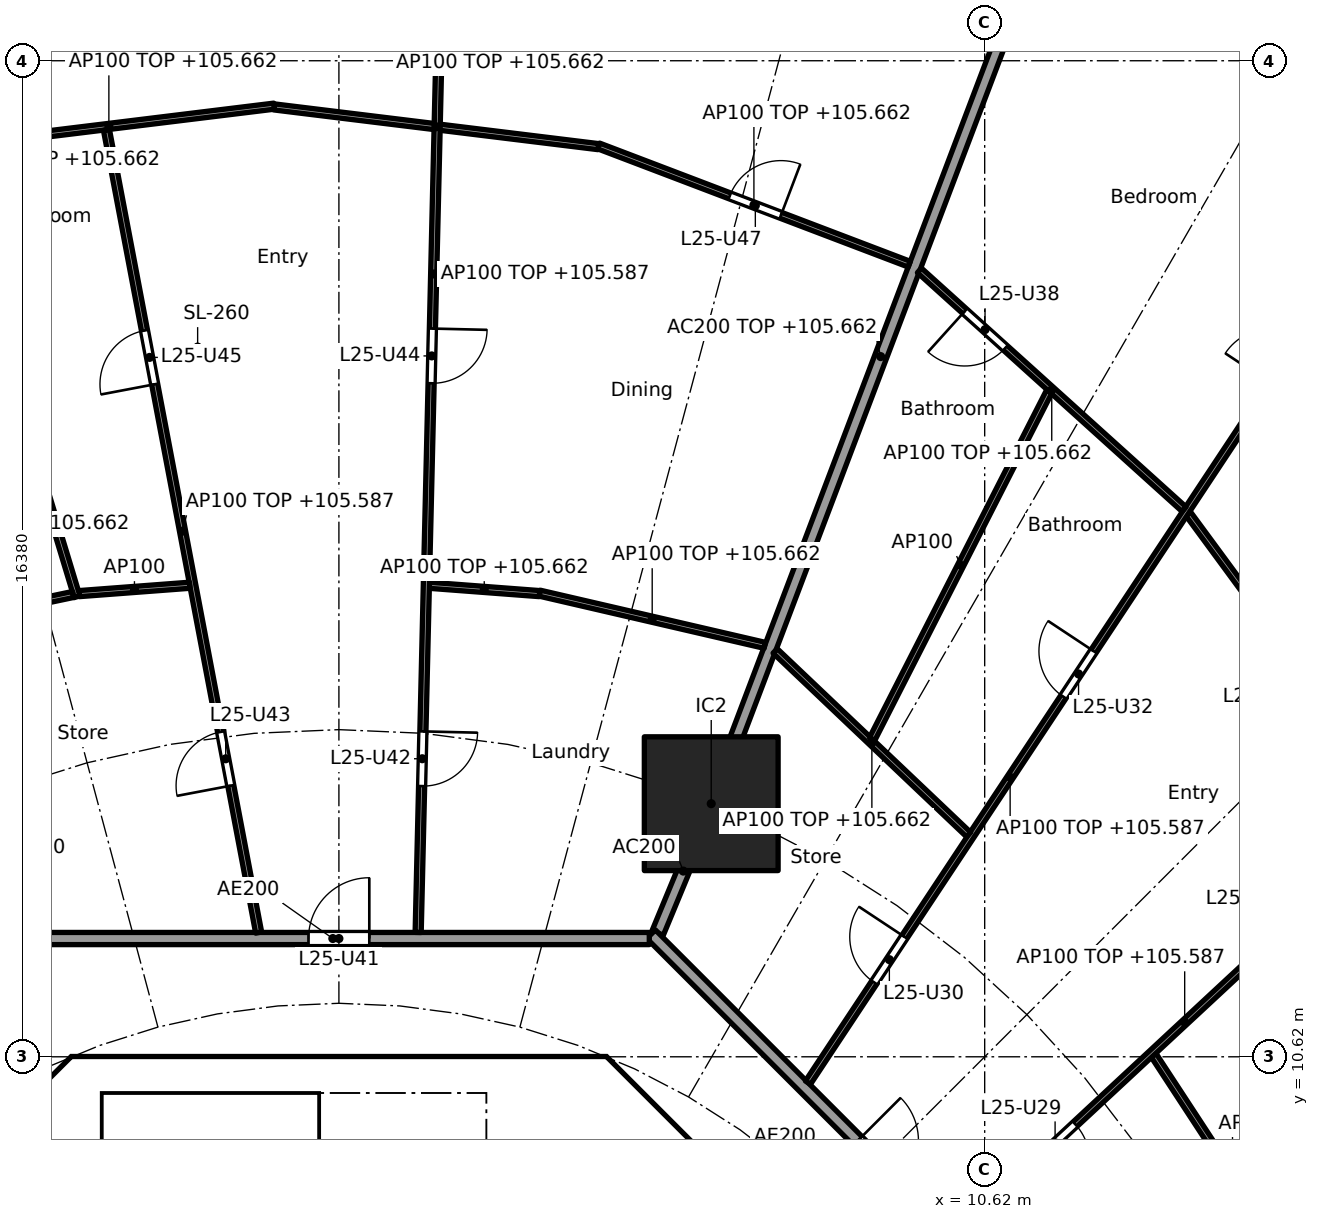
"""IFC4 building model, lengths in metres.
Left out: names, types, materials, properties, quantities, classifications, styles, units other than length and angle.
Written with IfcOpenShell. Run it as: python <this file> out.ifc"""

import sys

from ifc_helpers import new_model, si_unit, direction, frame, frame_2d, origin, origin_2d, place, context, subcontext, project, spatial, polyline, rectangle, outline, extrude, element, fill, save


model = new_model("IFC4")
c1 = context("Model", 3, precision=1e-05, world=origin(), true_north=direction((0.0, 1.0)))
c2 = subcontext(c1, "Body", "Model", "MODEL_VIEW")
j1 = project(units=[si_unit("LENGTHUNIT", "METRE"), si_unit("PLANEANGLEUNIT", "RADIAN")], contexts=[c1])
p1 = place(None, origin())
s1 = spatial("IfcSite", under=j1, at=p1, CompositionType="ELEMENT")
p2 = place(p1, origin())
s2 = spatial("IfcBuilding", under=s1, at=p2, CompositionType="ELEMENT")
p3 = place(p2, frame((0.0, 0.0, 102.9)))
s3 = spatial("IfcBuildingStorey", under=s2, at=p3, CompositionType="ELEMENT", Elevation=102.9)
p4 = place(p3, frame((6.123, 14.782, 0.0), z_axis=(0.0, 0.0, 1.0), x_axis=(1.0, 0.0, 0.0)))
e1 = element("IfcColumn", 1, at=p4, inside=s3, PredefinedType="COLUMN", context=c2, shape_type="SweptSolid", body=[
    extrude(rectangle(XDim=2.2, YDim=2.2, at=origin_2d()), origin(), (0.0, 0.0, 1.0), 3.7),
])
p5 = place(p3, frame((9.988, 4.613, 0.0), z_axis=(0.0, 0.0, 1.0), x_axis=(-0.707106781187, 0.707106781187, 0.0)))
e2 = element("IfcWall", 2, at=p5, inside=s3, PredefinedType="SHEAR", context=c2, shape_type="SweptSolid", body=[
    extrude(rectangle(XDim=7.602, YDim=0.6, at=frame_2d((3.801, 0.0))), origin(), (0.0, 0.0, 1.0), 3.44),
])
p6 = place(p5, frame((3.201, 0.0, 0.0)))
e3 = element("IfcOpeningElement", 3, at=p6, cuts=e2, PredefinedType="OPENING", context=c2, shape_type="SweptSolid", body=[
    extrude(rectangle(XDim=1.2, YDim=2.1, at=frame_2d((0.6, 1.05))), frame((0.0, 0.31, 0.0), z_axis=(0.0, -1.0, 0.0), x_axis=(1.0, 0.0, 0.0)), (0.0, 0.0, 1.0), 0.62),
])
p7 = place(p3, frame((-4.613, 9.988, 0.0), z_axis=(0.0, 0.0, 1.0), x_axis=(-0.707106781187, -0.707106781187, 0.0)))
e4 = element("IfcWall", 4, at=p7, inside=s3, PredefinedType="SHEAR", context=c2, shape_type="SweptSolid", body=[
    extrude(rectangle(XDim=7.602, YDim=0.6, at=frame_2d((3.801, 0.0))), origin(), (0.0, 0.0, 1.0), 3.44),
])
p8 = place(p7, frame((0.351, 0.0, 0.0)))
e5 = element("IfcOpeningElement", 5, at=p8, cuts=e4, PredefinedType="OPENING", context=c2, shape_type="SweptSolid", body=[
    extrude(rectangle(XDim=1.1, YDim=2.1, at=frame_2d((0.55, 1.05))), frame((0.0, 0.31, 0.0), z_axis=(0.0, -1.0, 0.0), x_axis=(1.0, 0.0, 0.0)), (0.0, 0.0, 1.0), 0.62),
])
p9 = place(p3, frame((4.0, 7.025, 0.0), z_axis=(0.0, 0.0, 1.0), x_axis=(0.0, 1.0, 0.0)))
e6 = element("IfcWall", 6, at=p9, inside=s3, PredefinedType="SOLIDWALL", context=c2, shape_type="SweptSolid", body=[
    extrude(rectangle(XDim=3.0, YDim=0.2, at=frame_2d((1.5, 0.0))), origin(), (0.0, 0.0, 1.0), 3.44),
])
p10 = place(p9, frame((0.925, 0.0, 0.0)))
e7 = element("IfcOpeningElement", 7, at=p10, cuts=e6, PredefinedType="OPENING", context=c2, shape_type="SweptSolid", body=[
    extrude(rectangle(XDim=1.1, YDim=2.1, at=frame_2d((0.55, 1.05))), frame((0.0, 0.11, 0.0), z_axis=(0.0, -1.0, 0.0), x_axis=(1.0, 0.0, 0.0)), (0.0, 0.0, 1.0), 0.22),
])
p11 = place(p3, origin())
e8 = element("IfcWall", 8, at=p11, inside=s3, PredefinedType="SHEAR", context=c2, shape_type="SweptSolid", body=[
    extrude(outline(polyline([(-4.152, 10.025), (-4.401, 9.776), (-4.825, 10.2), (-4.401, 10.625), (4.401, 10.625), (4.825, 10.2), (4.401, 9.776), (4.152, 10.025), (-4.152, 10.025)])), origin(), (0.0, 0.0, 1.0), 3.44),
])
p12 = place(p3, origin())
e9 = element("IfcWall", 9, at=p12, inside=s3, PredefinedType="SOLIDWALL", context=c2, shape_type="SweptSolid", body=[
    extrude(outline(polyline([(-3.9, 7.025), (-4.1, 7.025), (-4.1, 10.025), (-3.9, 10.025), (-3.9, 7.025)])), origin(), (0.0, 0.0, 1.0), 3.44),
])
p13 = place(p3, frame((5.243, 12.657, 0.0), z_axis=(0.0, 0.0, 1.0), x_axis=(0.382724096228, 0.923862687939, 0.0)))
e10 = element("IfcWall", 10, at=p13, inside=s3, PredefinedType="PARTITIONING", context=c2, shape_type="SweptSolid", body=[
    extrude(rectangle(XDim=2.201, YDim=0.2, at=frame_2d((1.1, 0.0))), origin(), (0.0, 0.0, 1.0), 3.44),
])
p14 = place(p3, frame((6.141, 14.829, 0.0), z_axis=(0.0, 0.0, 1.0), x_axis=(0.354477134193, 0.935064682968, 0.0)))
e11 = element("IfcWall", 11, at=p14, inside=s3, PredefinedType="PARTITIONING", context=c2, shape_type="SweptSolid", body=[
    extrude(rectangle(XDim=15.626, YDim=0.2, at=frame_2d((7.813, 0.0))), origin(), (0.0, 0.0, 1.0), 2.762),
])
p15 = place(p3, frame((12.635, 5.134, 0.0), z_axis=(0.0, 0.0, 1.0), x_axis=(-0.707106781187, 0.707106781187, 0.0)))
e12 = element("IfcWall", 12, at=p15, inside=s3, PredefinedType="PARTITIONING", context=c2, shape_type="SweptSolid", body=[
    extrude(rectangle(XDim=10.609, YDim=0.2, at=frame_2d((5.305, 0.0))), origin(), (0.0, 0.0, 1.0), 3.44),
])
p16 = place(p15, frame((4.804, 0.0, 0.0)))
e13 = element("IfcOpeningElement", 13, at=p16, cuts=e12, PredefinedType="OPENING", context=c2, shape_type="SweptSolid", body=[
    extrude(rectangle(XDim=1.0, YDim=2.1, at=frame_2d((0.5, 1.05))), frame((0.0, 0.11, 0.0), z_axis=(0.0, -1.0, 0.0), x_axis=(1.0, 0.0, 0.0)), (0.0, 0.0, 1.0), 0.22),
])
p17 = place(p3, frame((5.104, 12.565, 0.0), z_axis=(0.0, 0.0, 1.0), x_axis=(-1.0, 0.0, 0.0)))
e14 = element("IfcWall", 14, at=p17, inside=s3, PredefinedType="PARTITIONING", context=c2, shape_type="SweptSolid", body=[
    extrude(rectangle(XDim=10.409, YDim=0.2, at=frame_2d((5.205, 0.0))), origin(), (0.0, 0.0, 1.0), 3.44),
])
p18 = place(p17, frame((4.604, 0.0, 0.0)))
e15 = element("IfcOpeningElement", 15, at=p18, cuts=e14, PredefinedType="OPENING", context=c2, shape_type="SweptSolid", body=[
    extrude(rectangle(XDim=1.0, YDim=2.1, at=frame_2d((0.5, 1.05))), frame((0.0, 0.11, 0.0), z_axis=(0.0, -1.0, 0.0), x_axis=(1.0, 0.0, 0.0)), (0.0, 0.0, 1.0), 0.22),
])
p19 = place(p3, frame((15.992, 6.68, 0.0), z_axis=(0.0, 0.0, 1.0), x_axis=(-0.547472878942, 0.836823426311, 0.0)))
e16 = element("IfcWall", 16, at=p19, inside=s3, PredefinedType="PARTITIONING", context=c2, shape_type="SweptSolid", body=[
    extrude(rectangle(XDim=4.738, YDim=0.1, at=frame_2d((2.369, 0.0))), origin(), (0.0, 0.0, 1.0), 2.762),
])
p20 = place(p3, frame((10.185, 7.726, 0.0), z_axis=(0.0, 0.0, 1.0), x_axis=(0.732598472978, 0.680661059112, 0.0)))
e17 = element("IfcWall", 17, at=p20, inside=s3, PredefinedType="PARTITIONING", context=c2, shape_type="SweptSolid", body=[
    extrude(rectangle(XDim=10.167, YDim=0.1, at=frame_2d((5.084, 0.0))), origin(), (0.0, 0.0, 1.0), 2.687),
])
p21 = place(p20, frame((1.725, 0.0, 0.0)))
e18 = element("IfcOpeningElement", 18, at=p21, cuts=e17, PredefinedType="OPENING", context=c2, shape_type="SweptSolid", body=[
    extrude(rectangle(XDim=0.9, YDim=2.1, at=frame_2d((0.45, 1.05))), frame((0.0, 0.06, 0.0), z_axis=(0.0, -1.0, 0.0), x_axis=(1.0, 0.0, 0.0)), (0.0, 0.0, 1.0), 0.12),
])
p22 = place(p20, frame((6.784, 0.0, 0.0)))
e19 = element("IfcOpeningElement", 19, at=p22, cuts=e17, PredefinedType="OPENING", context=c2, shape_type="SweptSolid", body=[
    extrude(rectangle(XDim=0.9, YDim=2.1, at=frame_2d((0.45, 1.05))), frame((0.0, 0.06, 0.0), z_axis=(0.0, -1.0, 0.0), x_axis=(1.0, 0.0, 0.0)), (0.0, 0.0, 1.0), 0.12),
])
p23 = place(p3, frame((17.567, 14.653, 0.0), z_axis=(0.0, 0.0, 1.0), x_axis=(-0.592391983588, 0.80564988536, 0.0)))
e20 = element("IfcWall", 20, at=p23, inside=s3, PredefinedType="PARTITIONING", context=c2, shape_type="SweptSolid", body=[
    extrude(rectangle(XDim=6.08, YDim=0.1, at=frame_2d((3.04, 0.0))), origin(), (0.0, 0.0, 1.0), 2.762),
])
p24 = place(p23, frame((2.59, 0.0, 0.0)))
e21 = element("IfcOpeningElement", 21, at=p24, cuts=e20, PredefinedType="OPENING", context=c2, shape_type="SweptSolid", body=[
    extrude(rectangle(XDim=0.9, YDim=2.1, at=frame_2d((0.45, 1.05))), frame((0.0, 0.06, 0.0), z_axis=(0.0, -1.0, 0.0), x_axis=(1.0, 0.0, 0.0)), (0.0, 0.0, 1.0), 0.12),
])
p25 = place(p3, frame((7.713, 10.195, 0.0), z_axis=(0.0, 0.0, 1.0), x_axis=(0.552111071171, 0.833770571015, 0.0)))
e22 = element("IfcWall", 22, at=p25, inside=s3, PredefinedType="PARTITIONING", context=c2, shape_type="SweptSolid", body=[
    extrude(rectangle(XDim=17.208, YDim=0.1, at=frame_2d((8.604, 0.0))), origin(), (0.0, 0.0, 1.0), 2.687),
])
p26 = place(p25, frame((1.976, 0.0, 0.0)))
e23 = element("IfcOpeningElement", 23, at=p26, cuts=e22, PredefinedType="OPENING", context=c2, shape_type="SweptSolid", body=[
    extrude(rectangle(XDim=0.9, YDim=2.1, at=frame_2d((0.45, 1.05))), frame((0.0, 0.06, 0.0), z_axis=(0.0, -1.0, 0.0), x_axis=(1.0, 0.0, 0.0)), (0.0, 0.0, 1.0), 0.12),
])
p27 = place(p25, frame((7.611, 0.0, 0.0)))
e24 = element("IfcOpeningElement", 24, at=p27, cuts=e22, PredefinedType="OPENING", context=c2, shape_type="SweptSolid", body=[
    extrude(rectangle(XDim=0.9, YDim=2.1, at=frame_2d((0.45, 1.05))), frame((0.0, 0.06, 0.0), z_axis=(0.0, -1.0, 0.0), x_axis=(1.0, 0.0, 0.0)), (0.0, 0.0, 1.0), 0.12),
])
p28 = place(p25, frame((13.79, 0.0, 0.0)))
e25 = element("IfcOpeningElement", 25, at=p28, cuts=e22, PredefinedType="OPENING", context=c2, shape_type="SweptSolid", body=[
    extrude(rectangle(XDim=0.9, YDim=2.1, at=frame_2d((0.45, 1.05))), frame((0.0, 0.06, 0.0), z_axis=(0.0, -1.0, 0.0), x_axis=(1.0, 0.0, 0.0)), (0.0, 0.0, 1.0), 0.12),
])
p29 = place(p3, frame((10.355, 14.274, 0.0), z_axis=(0.0, 0.0, 1.0), x_axis=(-0.725206433622, 0.688531501555, 0.0)))
e26 = element("IfcWall", 26, at=p29, inside=s3, PredefinedType="PARTITIONING", context=c2, shape_type="SweptSolid", body=[
    extrude(rectangle(XDim=4.387, YDim=0.1, at=frame_2d((2.193, 0.0))), origin(), (0.0, 0.0, 1.0), 2.762),
])
p30 = place(p3, frame((13.898, 19.625, 0.0), z_axis=(0.0, 0.0, 1.0), x_axis=(-0.742396654702, 0.669960601146, 0.0)))
e27 = element("IfcWall", 27, at=p30, inside=s3, PredefinedType="PARTITIONING", context=c2, shape_type="SweptSolid", body=[
    extrude(rectangle(XDim=5.861, YDim=0.1, at=frame_2d((2.931, 0.0))), origin(), (0.0, 0.0, 1.0), 2.762),
])
p31 = place(p30, frame((3.958, 0.0, 0.0)))
e28 = element("IfcOpeningElement", 28, at=p31, cuts=e27, PredefinedType="OPENING", context=c2, shape_type="SweptSolid", body=[
    extrude(rectangle(XDim=0.9, YDim=2.1, at=frame_2d((0.45, 1.05))), frame((0.0, 0.06, 0.0), z_axis=(0.0, -1.0, 0.0), x_axis=(1.0, 0.0, 0.0)), (0.0, 0.0, 1.0), 0.12),
])
p32 = place(p3, frame((8.769, 15.846, 0.0), z_axis=(0.0, 0.0, 1.0), x_axis=(0.454067187552, 0.890967445639, 0.0)))
e29 = element("IfcWall", 29, at=p32, inside=s3, PredefinedType="PARTITIONING", context=c2, shape_type="SweptSolid", body=[
    extrude(rectangle(XDim=6.414, YDim=0.1, at=frame_2d((3.207, 0.0))), origin(), (0.0, 0.0, 1.0), 3.44),
])
p33 = place(p3, frame((7.004, 17.386, 0.0), z_axis=(0.0, 0.0, 1.0), x_axis=(-0.974179728512, 0.225773905837, 0.0)))
e30 = element("IfcWall", 30, at=p33, inside=s3, PredefinedType="PARTITIONING", context=c2, shape_type="SweptSolid", body=[
    extrude(rectangle(XDim=3.802, YDim=0.1, at=frame_2d((1.901, 0.0))), origin(), (0.0, 0.0, 1.0), 2.762),
])
p34 = place(p3, frame((9.379, 23.655, 0.0), z_axis=(0.0, 0.0, 1.0), x_axis=(-0.934609369022, 0.355675873986, 0.0)))
e31 = element("IfcWall", 31, at=p34, inside=s3, PredefinedType="PARTITIONING", context=c2, shape_type="SweptSolid", body=[
    extrude(rectangle(XDim=5.467, YDim=0.1, at=frame_2d((2.733, 0.0))), origin(), (0.0, 0.0, 1.0), 2.762),
])
p35 = place(p34, frame((2.258, 0.0, 0.0)))
e32 = element("IfcOpeningElement", 32, at=p35, cuts=e31, PredefinedType="OPENING", context=c2, shape_type="SweptSolid", body=[
    extrude(rectangle(XDim=0.9, YDim=2.1, at=frame_2d((0.45, 1.05))), frame((0.0, 0.06, 0.0), z_axis=(0.0, -1.0, 0.0), x_axis=(1.0, 0.0, 0.0)), (0.0, 0.0, 1.0), 0.12),
])
p36 = place(p3, frame((3.299, 18.237, 0.0), z_axis=(0.0, 0.0, 1.0), x_axis=(-0.997152920483, 0.075405922664, 0.0)))
e33 = element("IfcWall", 33, at=p36, inside=s3, PredefinedType="PARTITIONING", context=c2, shape_type="SweptSolid", body=[
    extrude(rectangle(XDim=1.823, YDim=0.1, at=frame_2d((0.911, 0.0))), origin(), (0.0, 0.0, 1.0), 2.762),
])
p37 = place(p3, frame((4.267, 25.587, 0.0), z_axis=(0.0, 0.0, 1.0), x_axis=(-0.992576206119, 0.121624319302, 0.0)))
e34 = element("IfcWall", 34, at=p37, inside=s3, PredefinedType="PARTITIONING", context=c2, shape_type="SweptSolid", body=[
    extrude(rectangle(XDim=5.374, YDim=0.1, at=frame_2d((2.687, 0.0))), origin(), (0.0, 0.0, 1.0), 2.762),
])
p38 = place(p3, frame((1.303, 12.665, 0.0), z_axis=(0.0, 0.0, 1.0), x_axis=(0.023564110689, 0.999722327793, 0.0)))
e35 = element("IfcWall", 35, at=p38, inside=s3, PredefinedType="PARTITIONING", context=c2, shape_type="SweptSolid", body=[
    extrude(rectangle(XDim=21.664, YDim=0.1, at=frame_2d((10.832, 0.0))), origin(), (0.0, 0.0, 1.0), 2.687),
])
p39 = place(p38, frame((2.407, 0.0, 0.0)))
e36 = element("IfcOpeningElement", 36, at=p39, cuts=e35, PredefinedType="OPENING", context=c2, shape_type="SweptSolid", body=[
    extrude(rectangle(XDim=0.9, YDim=2.1, at=frame_2d((0.45, 1.05))), frame((0.0, 0.06, 0.0), z_axis=(0.0, -1.0, 0.0), x_axis=(1.0, 0.0, 0.0)), (0.0, 0.0, 1.0), 0.12),
])
p40 = place(p38, frame((9.034, 0.0, 0.0)))
e37 = element("IfcOpeningElement", 37, at=p40, cuts=e35, PredefinedType="OPENING", context=c2, shape_type="SweptSolid", body=[
    extrude(rectangle(XDim=0.9, YDim=2.1, at=frame_2d((0.45, 1.05))), frame((0.0, 0.06, 0.0), z_axis=(0.0, -1.0, 0.0), x_axis=(1.0, 0.0, 0.0)), (0.0, 0.0, 1.0), 0.12),
])
p41 = place(p38, frame((17.009, 0.0, 0.0)))
e38 = element("IfcOpeningElement", 38, at=p41, cuts=e35, PredefinedType="OPENING", context=c2, shape_type="SweptSolid", body=[
    extrude(rectangle(XDim=0.9, YDim=2.1, at=frame_2d((0.45, 1.05))), frame((0.0, 0.06, 0.0), z_axis=(0.0, -1.0, 0.0), x_axis=(1.0, 0.0, 0.0)), (0.0, 0.0, 1.0), 0.12),
])
p42 = place(p3, frame((-1.066, 26.253, 0.0), z_axis=(0.0, 0.0, 1.0), x_axis=(-0.992574853421, -0.121635358166, 0.0)))
e39 = element("IfcWall", 39, at=p42, inside=s3, PredefinedType="PARTITIONING", context=c2, shape_type="SweptSolid", body=[
    extrude(rectangle(XDim=5.473, YDim=0.1, at=frame_2d((2.737, 0.0))), origin(), (0.0, 0.0, 1.0), 2.762),
])
p43 = place(p3, frame((-1.32, 12.663, 0.0), z_axis=(0.0, 0.0, 1.0), x_axis=(-0.186308855238, 0.982491226658, 0.0)))
e40 = element("IfcWall", 40, at=p43, inside=s3, PredefinedType="PARTITIONING", context=c2, shape_type="SweptSolid", body=[
    extrude(rectangle(XDim=13.437, YDim=0.1, at=frame_2d((6.719, 0.0))), origin(), (0.0, 0.0, 1.0), 2.687),
])
p44 = place(p43, frame((2.458, 0.0, 0.0)))
e41 = element("IfcOpeningElement", 41, at=p44, cuts=e40, PredefinedType="OPENING", context=c2, shape_type="SweptSolid", body=[
    extrude(rectangle(XDim=0.9, YDim=2.1, at=frame_2d((0.45, 1.05))), frame((0.0, 0.06, 0.0), z_axis=(0.0, -1.0, 0.0), x_axis=(1.0, 0.0, 0.0)), (0.0, 0.0, 1.0), 0.12),
])
p45 = place(p43, frame((9.177, 0.0, 0.0)))
e42 = element("IfcOpeningElement", 42, at=p45, cuts=e40, PredefinedType="OPENING", context=c2, shape_type="SweptSolid", body=[
    extrude(rectangle(XDim=0.9, YDim=2.1, at=frame_2d((0.45, 1.05))), frame((0.0, 0.06, 0.0), z_axis=(0.0, -1.0, 0.0), x_axis=(1.0, 0.0, 0.0)), (0.0, 0.0, 1.0), 0.12),
])
p46 = place(p3, frame((-2.453, 18.374, 0.0), z_axis=(0.0, 0.0, 1.0), x_axis=(-0.997153681897, -0.075395853197, 0.0)))
e43 = element("IfcWall", 43, at=p46, inside=s3, PredefinedType="PARTITIONING", context=c2, shape_type="SweptSolid", body=[
    extrude(rectangle(XDim=1.823, YDim=0.1, at=frame_2d((0.912, 0.0))), origin(), (0.0, 0.0, 1.0), 3.44),
])
p47 = place(p3, frame((-4.306, 18.185, 0.0), z_axis=(0.0, 0.0, 1.0), x_axis=(-0.290183838394, 0.956970919064, 0.0)))
e44 = element("IfcWall", 44, at=p47, inside=s3, PredefinedType="PARTITIONING", context=c2, shape_type="SweptSolid", body=[
    extrude(rectangle(XDim=15.015, YDim=0.1, at=frame_2d((7.508, 0.0))), origin(), (0.0, 0.0, 1.0), 2.762),
])
p48 = place(p47, frame((10.922, 0.0, 0.0)))
e45 = element("IfcOpeningElement", 45, at=p48, cuts=e44, PredefinedType="OPENING", context=c2, shape_type="SweptSolid", body=[
    extrude(rectangle(XDim=0.9, YDim=2.1, at=frame_2d((0.45, 1.05))), frame((0.0, 0.06, 0.0), z_axis=(0.0, -1.0, 0.0), x_axis=(1.0, 0.0, 0.0)), (0.0, 0.0, 1.0), 0.12),
])
p49 = place(p3, frame((-4.37, 18.223, 0.0), z_axis=(0.0, 0.0, 1.0), x_axis=(-0.978633053291, -0.205614559323, 0.0)))
e46 = element("IfcWall", 46, at=p49, inside=s3, PredefinedType="PARTITIONING", context=c2, shape_type="SweptSolid", body=[
    extrude(rectangle(XDim=3.387, YDim=0.1, at=frame_2d((1.694, 0.0))), origin(), (0.0, 0.0, 1.0), 2.762),
])
p50 = place(p49, frame((1.244, 0.0, 0.0)))
e47 = element("IfcOpeningElement", 47, at=p50, cuts=e46, PredefinedType="OPENING", context=c2, shape_type="SweptSolid", body=[
    extrude(rectangle(XDim=0.9, YDim=2.1, at=frame_2d((0.45, 1.05))), frame((0.0, 0.06, 0.0), z_axis=(0.0, -1.0, 0.0), x_axis=(1.0, 0.0, 0.0)), (0.0, 0.0, 1.0), 0.12),
])
p51 = place(p21, frame((0.9, 0.0, 0.0), x_axis=(-1.0, 0.0, 0.0)))
e48 = element("IfcDoor", 48, at=p51, inside=s3, OperationType="SINGLE_SWING_RIGHT", PredefinedType="DOOR", context=c2, shape_type="SweptSolid", body=[
    extrude(rectangle(XDim=0.9, YDim=2.1, at=frame_2d((0.45, 1.05))), frame((0.0, 0.025, 0.0), z_axis=(0.0, -1.0, 0.0), x_axis=(1.0, 0.0, 0.0)), (0.0, 0.0, 1.0), 0.05),
])
fill(e18, e48)
p52 = place(p26, origin())
e49 = element("IfcDoor", 49, at=p52, inside=s3, OperationType="SINGLE_SWING_RIGHT", PredefinedType="DOOR", context=c2, shape_type="SweptSolid", body=[
    extrude(rectangle(XDim=0.9, YDim=2.1, at=frame_2d((0.45, 1.05))), frame((0.0, 0.025, 0.0), z_axis=(0.0, -1.0, 0.0), x_axis=(1.0, 0.0, 0.0)), (0.0, 0.0, 1.0), 0.05),
])
fill(e23, e49)
p53 = place(p27, origin())
e50 = element("IfcDoor", 50, at=p53, inside=s3, OperationType="SINGLE_SWING_RIGHT", PredefinedType="DOOR", context=c2, shape_type="SweptSolid", body=[
    extrude(rectangle(XDim=0.9, YDim=2.1, at=frame_2d((0.45, 1.05))), frame((0.0, 0.025, 0.0), z_axis=(0.0, -1.0, 0.0), x_axis=(1.0, 0.0, 0.0)), (0.0, 0.0, 1.0), 0.05),
])
fill(e24, e50)
p54 = place(p31, origin())
e51 = element("IfcDoor", 51, at=p54, inside=s3, OperationType="SINGLE_SWING_RIGHT", PredefinedType="DOOR", context=c2, shape_type="SweptSolid", body=[
    extrude(rectangle(XDim=0.9, YDim=2.1, at=frame_2d((0.45, 1.05))), frame((0.0, 0.025, 0.0), z_axis=(0.0, -1.0, 0.0), x_axis=(1.0, 0.0, 0.0)), (0.0, 0.0, 1.0), 0.05),
])
fill(e28, e51)
p55 = place(p18, frame((1.0, 0.0, 0.0), x_axis=(-1.0, 0.0, 0.0)))
e52 = element("IfcDoor", 52, at=p55, inside=s3, OperationType="SINGLE_SWING_RIGHT", PredefinedType="DOOR", context=c2, shape_type="SweptSolid", body=[
    extrude(rectangle(XDim=1.0, YDim=2.1, at=frame_2d((0.5, 1.05))), frame((0.0, 0.025, 0.0), z_axis=(0.0, -1.0, 0.0), x_axis=(1.0, 0.0, 0.0)), (0.0, 0.0, 1.0), 0.05),
])
fill(e15, e52)
p56 = place(p39, frame((0.9, 0.0, 0.0), x_axis=(-1.0, 0.0, 0.0)))
e53 = element("IfcDoor", 53, at=p56, inside=s3, OperationType="SINGLE_SWING_LEFT", PredefinedType="DOOR", context=c2, shape_type="SweptSolid", body=[
    extrude(rectangle(XDim=0.9, YDim=2.1, at=frame_2d((0.45, 1.05))), frame((0.0, 0.025, 0.0), z_axis=(0.0, -1.0, 0.0), x_axis=(1.0, 0.0, 0.0)), (0.0, 0.0, 1.0), 0.05),
])
fill(e36, e53)
p57 = place(p44, origin())
e54 = element("IfcDoor", 54, at=p57, inside=s3, OperationType="SINGLE_SWING_LEFT", PredefinedType="DOOR", context=c2, shape_type="SweptSolid", body=[
    extrude(rectangle(XDim=0.9, YDim=2.1, at=frame_2d((0.45, 1.05))), frame((0.0, 0.025, 0.0), z_axis=(0.0, -1.0, 0.0), x_axis=(1.0, 0.0, 0.0)), (0.0, 0.0, 1.0), 0.05),
])
fill(e41, e54)
p58 = place(p40, frame((0.9, 0.0, 0.0), x_axis=(-1.0, 0.0, 0.0)))
e55 = element("IfcDoor", 55, at=p58, inside=s3, OperationType="SINGLE_SWING_LEFT", PredefinedType="DOOR", context=c2, shape_type="SweptSolid", body=[
    extrude(rectangle(XDim=0.9, YDim=2.1, at=frame_2d((0.45, 1.05))), frame((0.0, 0.025, 0.0), z_axis=(0.0, -1.0, 0.0), x_axis=(1.0, 0.0, 0.0)), (0.0, 0.0, 1.0), 0.05),
])
fill(e37, e55)
p59 = place(p45, origin())
e56 = element("IfcDoor", 56, at=p59, inside=s3, OperationType="SINGLE_SWING_LEFT", PredefinedType="DOOR", context=c2, shape_type="SweptSolid", body=[
    extrude(rectangle(XDim=0.9, YDim=2.1, at=frame_2d((0.45, 1.05))), frame((0.0, 0.025, 0.0), z_axis=(0.0, -1.0, 0.0), x_axis=(1.0, 0.0, 0.0)), (0.0, 0.0, 1.0), 0.05),
])
fill(e42, e56)
p60 = place(p35, frame((0.9, 0.0, 0.0), x_axis=(-1.0, 0.0, 0.0)))
e57 = element("IfcDoor", 57, at=p60, inside=s3, OperationType="SINGLE_SWING_RIGHT", PredefinedType="DOOR", context=c2, shape_type="SweptSolid", body=[
    extrude(rectangle(XDim=0.9, YDim=2.1, at=frame_2d((0.45, 1.05))), frame((0.0, 0.025, 0.0), z_axis=(0.0, -1.0, 0.0), x_axis=(1.0, 0.0, 0.0)), (0.0, 0.0, 1.0), 0.05),
])
fill(e32, e57)
save(model, sys.argv[1])
